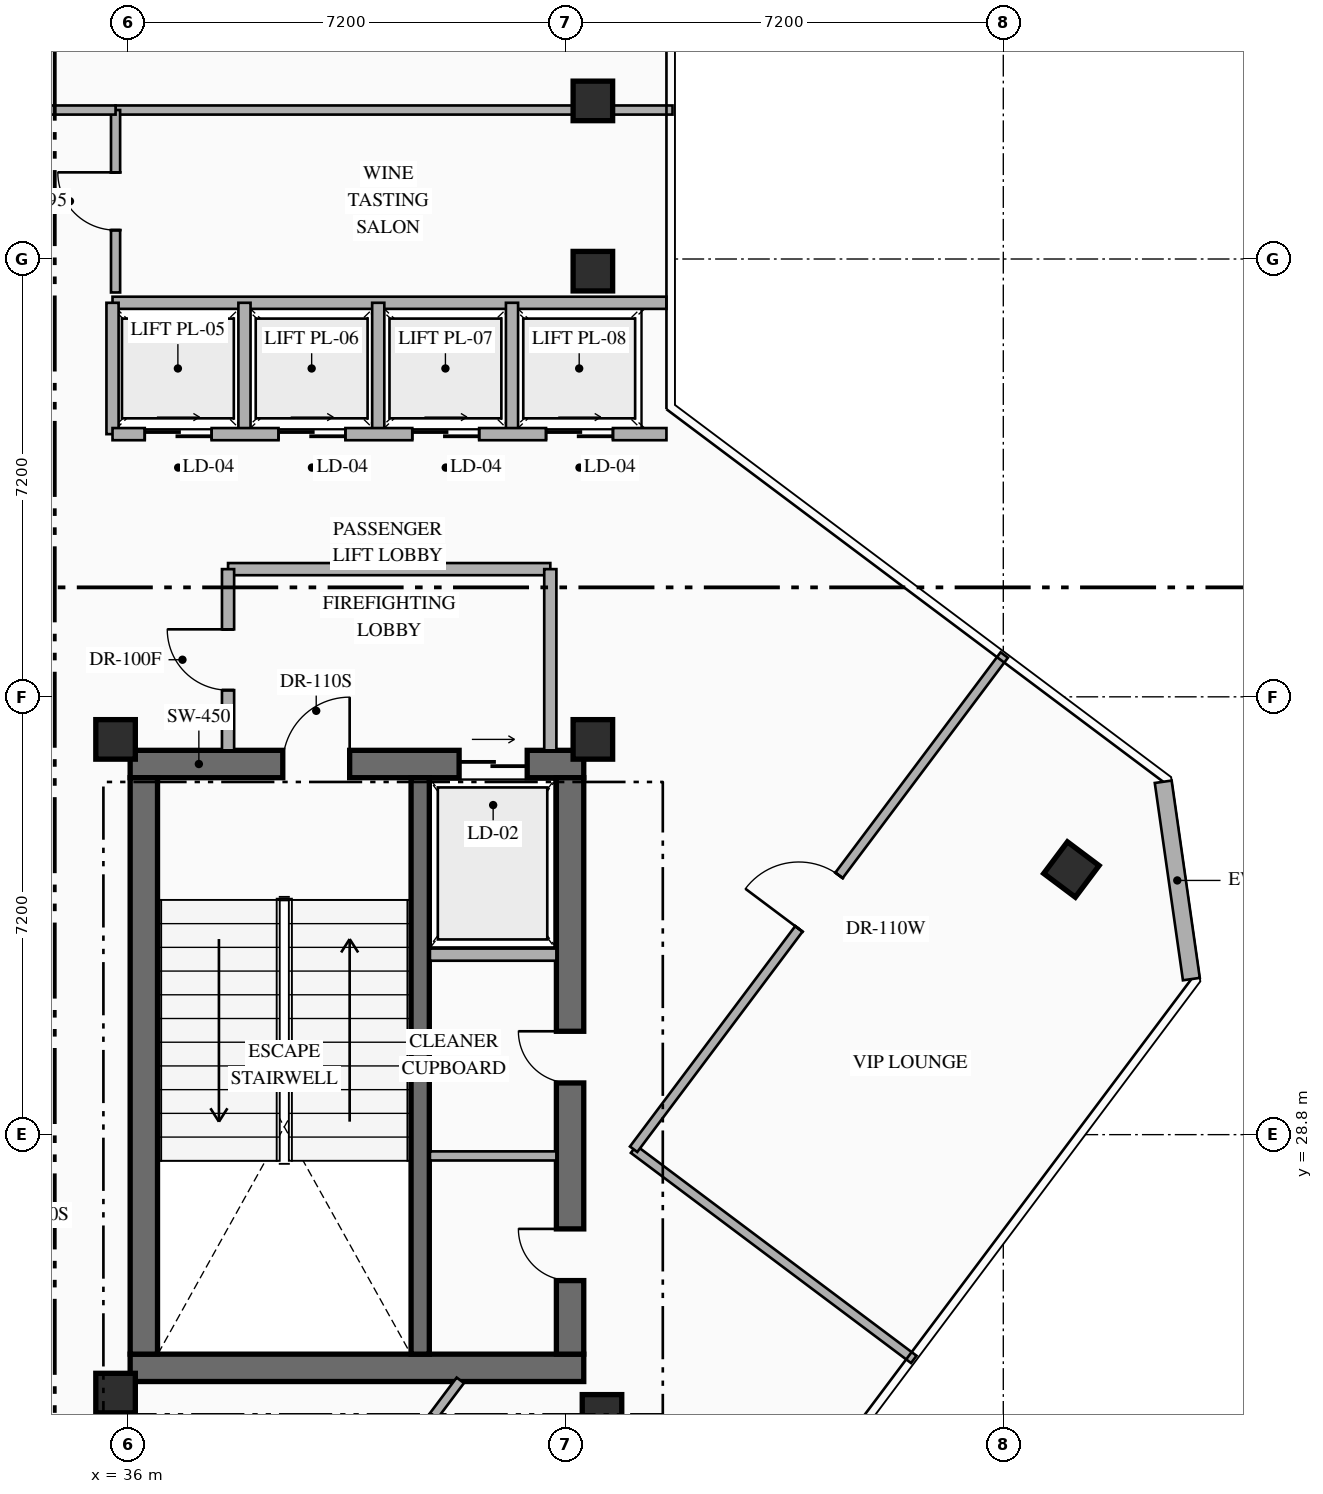
"""IFC4 building model, lengths in metres.
Left out: names, types, materials, properties, quantities, classifications, styles, units other than length and angle.
Written with IfcOpenShell. Run it as: python <this file> out.ifc"""

import sys

from ifc_helpers import new_model, si_unit, direction, frame, frame_2d, origin, origin_2d, place, context, subcontext, project, spatial, rectangle, hollow_rectangle, extrude, element, fill, save


model = new_model("IFC4")
c1 = context("Model", 3, precision=1e-05, world=origin(), true_north=direction((0.0, 1.0)))
c2 = subcontext(c1, "Body", "Model", "MODEL_VIEW")
j1 = project(units=[si_unit("LENGTHUNIT", "METRE"), si_unit("PLANEANGLEUNIT", "RADIAN")], contexts=[c1])
p1 = place(None, origin())
s1 = spatial("IfcSite", under=j1, at=p1, CompositionType="ELEMENT")
p2 = place(p1, origin())
s2 = spatial("IfcBuilding", under=s1, at=p2, CompositionType="ELEMENT")
p3 = place(p2, frame((0.0, 0.0, 257.55)))
s3 = spatial("IfcBuildingStorey", under=s2, at=p3, CompositionType="ELEMENT", Elevation=257.55)
p4 = place(p3, frame((36.04, 24.965, 0.0), z_axis=(0.0, 0.0, 1.0), x_axis=(1.0, 0.0, 0.0)))
e1 = element("IfcWall", 1, at=p4, inside=s3, PredefinedType="SHEAR", context=c2, shape_type="SweptSolid", body=[
    extrude(rectangle(XDim=7.46, YDim=0.45, at=frame_2d((3.73, 0.0))), origin(), (0.0, 0.0, 1.0), 4.2),
])
p5 = place(p3, frame((36.04, 34.895, 0.0), z_axis=(0.0, 0.0, 1.0), x_axis=(1.0, 0.0, 0.0)))
e2 = element("IfcWall", 2, at=p5, inside=s3, PredefinedType="SHEAR", context=c2, shape_type="SweptSolid", body=[
    extrude(rectangle(XDim=7.46, YDim=0.45, at=frame_2d((3.73, 0.0))), origin(), (0.0, 0.0, 1.0), 4.2),
])
p6 = place(p5, frame((2.51, 0.0, 0.0)))
e3 = element("IfcOpeningElement", 3, at=p6, cuts=e2, PredefinedType="OPENING", context=c2, shape_type="SweptSolid", body=[
    extrude(rectangle(XDim=1.1, YDim=2.2, at=frame_2d((0.55, 1.1))), frame((0.0, 0.235, 0.0), z_axis=(0.0, -1.0, 0.0), x_axis=(1.0, 0.0, 0.0)), (0.0, 0.0, 1.0), 0.47),
])
p7 = place(p5, frame((5.41, 0.0, 0.0)))
e4 = element("IfcOpeningElement", 4, at=p7, cuts=e2, PredefinedType="OPENING", context=c2, shape_type="SweptSolid", body=[
    extrude(rectangle(XDim=1.12, YDim=2.15, at=frame_2d((0.56, 1.075))), frame((0.0, 0.235, 0.0), z_axis=(0.0, -1.0, 0.0), x_axis=(1.0, 0.0, 0.0)), (0.0, 0.0, 1.0), 0.47),
])
p8 = place(p3, frame((36.265, 25.19, 0.0), z_axis=(0.0, 0.0, 1.0), x_axis=(0.0, 1.0, 0.0)))
e5 = element("IfcWall", 5, at=p8, inside=s3, PredefinedType="SHEAR", context=c2, shape_type="SweptSolid", body=[
    extrude(rectangle(XDim=9.48, YDim=0.45, at=frame_2d((4.74, 0.0))), origin(), (0.0, 0.0, 1.0), 4.2),
])
p9 = place(p3, frame((43.275, 25.19, 0.0), z_axis=(0.0, 0.0, 1.0), x_axis=(0.0, 1.0, 0.0)))
e6 = element("IfcWall", 6, at=p9, inside=s3, PredefinedType="SHEAR", context=c2, shape_type="SweptSolid", body=[
    extrude(rectangle(XDim=9.48, YDim=0.45, at=frame_2d((4.74, 0.0))), origin(), (0.0, 0.0, 1.0), 4.2),
])
p10 = place(p9, frame((1.21, 0.0, 0.0)))
e7 = element("IfcOpeningElement", 7, at=p10, cuts=e6, PredefinedType="OPENING", context=c2, shape_type="SweptSolid", body=[
    extrude(rectangle(XDim=0.85, YDim=2.08, at=frame_2d((0.425, 1.04))), frame((0.0, 0.235, 0.0), z_axis=(0.0, -1.0, 0.0), x_axis=(1.0, 0.0, 0.0)), (0.0, 0.0, 1.0), 0.47),
])
p11 = place(p9, frame((4.46, 0.0, 0.0)))
e8 = element("IfcOpeningElement", 8, at=p11, cuts=e6, PredefinedType="OPENING", context=c2, shape_type="SweptSolid", body=[
    extrude(rectangle(XDim=0.85, YDim=2.08, at=frame_2d((0.425, 1.04))), frame((0.0, 0.235, 0.0), z_axis=(0.0, -1.0, 0.0), x_axis=(1.0, 0.0, 0.0)), (0.0, 0.0, 1.0), 0.47),
])
p12 = place(p3, frame((40.81, 25.19, 0.0), z_axis=(0.0, 0.0, 1.0), x_axis=(0.0, 1.0, 0.0)))
e9 = element("IfcWall", 9, at=p12, inside=s3, PredefinedType="SHEAR", context=c2, shape_type="SweptSolid", body=[
    extrude(rectangle(XDim=9.48, YDim=0.3, at=frame_2d((4.74, 0.0))), origin(), (0.0, 0.0, 1.0), 4.2),
])
for number, where, z_axis, x_axis in (
    (10, (35.8, 24.55, 0.0), (0.0, 0.0, 1.0), (1.0, 0.0, 0.0)),
    (11, (43.8, 24.2, 0.0), (0.0, 0.0, 1.0), (1.0, 0.0, 0.0)),
    (12, (35.8, 35.3, 0.0), (0.0, 0.0, 1.0), (1.0, 0.0, 0.0)),
    (13, (43.65, 35.3, 0.0), (0.0, 0.0, 1.0), (1.0, 0.0, 0.0)),
    (14, (43.65, 43.0, 0.0), (0.0, 0.0, 1.0), (1.0, 0.0, 0.0)),
    (15, (43.65, 45.8, 0.0), (0.0, 0.0, 1.0), (1.0, 0.0, 0.0)),
    (16, (51.52, 33.16, 0.0), (0.0, 0.0, 1.0), (0.8, -0.6, 0.0)),
):
    element("IfcColumn", number, at=place(p3, frame(where, z_axis=z_axis, x_axis=x_axis)), inside=s3, PredefinedType="COLUMN", context=c2, shape_type="SweptSolid", body=[
        extrude(hollow_rectangle(XDim=0.65, YDim=0.65, WallThickness=0.025, at=origin_2d()), origin(), (0.0, 0.0, 1.0), 4.2),
    ])
p13 = place(p3, frame((53.03, 34.603, 0.0), z_axis=(0.0, 0.0, 1.0), x_axis=(0.141212810973, -0.989979263428, 0.0)))
e17 = element("IfcWall", 17, at=p13, inside=s3, PredefinedType="STANDARD", context=c2, shape_type="SweptSolid", body=[
    extrude(rectangle(XDim=3.278, YDim=0.28, at=frame_2d((1.639, 0.0))), origin(), (0.0, 0.0, 1.0), 3.95),
])
p14 = place(p3, frame((40.97, 31.76, 0.0), z_axis=(0.0, 0.0, 1.0), x_axis=(1.0, 0.0, 0.0)))
e18 = element("IfcWall", 18, at=p14, inside=s3, PredefinedType="STANDARD", context=c2, shape_type="SweptSolid", body=[
    extrude(rectangle(XDim=2.08, YDim=0.2, at=frame_2d((1.04, 0.0))), origin(), (0.0, 0.0, 1.0), 3.95),
])
p15 = place(p3, frame((40.97, 28.45, 0.0), z_axis=(0.0, 0.0, 1.0), x_axis=(1.0, 0.0, 0.0)))
e19 = element("IfcWall", 19, at=p15, inside=s3, PredefinedType="PARTITIONING", context=c2, shape_type="SweptSolid", body=[
    extrude(rectangle(XDim=2.08, YDim=0.15, at=frame_2d((1.04, 0.0))), origin(), (0.0, 0.0, 1.0), 3.95),
])
p16 = place(p3, frame((37.65, 38.1, 0.0), z_axis=(0.0, 0.0, 1.0), x_axis=(1.0, 0.0, 0.0)))
e20 = element("IfcWall", 20, at=p16, inside=s3, PredefinedType="STANDARD", context=c2, shape_type="SweptSolid", body=[
    extrude(rectangle(XDim=5.3, YDim=0.2, at=frame_2d((2.65, 0.0))), origin(), (0.0, 0.0, 1.0), 3.95),
])
p17 = place(p3, frame((42.95, 35.12, 0.0), z_axis=(0.0, 0.0, 1.0), x_axis=(0.0, 1.0, 0.0)))
e21 = element("IfcWall", 21, at=p17, inside=s3, PredefinedType="STANDARD", context=c2, shape_type="SweptSolid", body=[
    extrude(rectangle(XDim=2.98, YDim=0.2, at=frame_2d((1.49, 0.0))), origin(), (0.0, 0.0, 1.0), 3.95),
])
p18 = place(p3, frame((37.65, 35.12, 0.0), z_axis=(0.0, 0.0, 1.0), x_axis=(0.0, 1.0, 0.0)))
e22 = element("IfcWall", 22, at=p18, inside=s3, PredefinedType="STANDARD", context=c2, shape_type="SweptSolid", body=[
    extrude(rectangle(XDim=2.98, YDim=0.2, at=frame_2d((1.49, 0.0))), origin(), (0.0, 0.0, 1.0), 3.95),
])
p19 = place(p18, frame((0.99, 0.0, 0.0)))
e23 = element("IfcOpeningElement", 23, at=p19, cuts=e22, PredefinedType="OPENING", context=c2, shape_type="SweptSolid", body=[
    extrude(rectangle(XDim=1.0, YDim=2.2, at=frame_2d((0.5, 1.1))), frame((0.0, 0.11, 0.0), z_axis=(0.0, -1.0, 0.0), x_axis=(1.0, 0.0, 0.0)), (0.0, 0.0, 1.0), 0.22),
])
p20 = place(p3, frame((35.75, 42.48, 0.0), z_axis=(0.0, 0.0, 1.0), x_axis=(1.0, 0.0, 0.0)))
e24 = element("IfcWall", 24, at=p20, inside=s3, PredefinedType="STANDARD", context=c2, shape_type="SweptSolid", body=[
    extrude(rectangle(XDim=9.11, YDim=0.2, at=frame_2d((4.555, 0.0))), origin(), (0.0, 0.0, 1.0), 3.95),
])
for number, where, z_axis, x_axis in (
    (25, (35.75, 40.32, 0.0), (0.0, 0.0, 1.0), (0.0, 1.0, 0.0)),
    (26, (37.92, 40.32, 0.0), (0.0, 0.0, 1.0), (0.0, 1.0, 0.0)),
    (27, (40.12, 40.32, 0.0), (0.0, 0.0, 1.0), (0.0, 1.0, 0.0)),
    (28, (42.32, 40.32, 0.0), (0.0, 0.0, 1.0), (0.0, 1.0, 0.0)),
):
    element("IfcWall", number, at=place(p3, frame(where, z_axis=z_axis, x_axis=x_axis)), inside=s3, PredefinedType="STANDARD", context=c2, shape_type="SweptSolid", body=[
        extrude(rectangle(XDim=2.16, YDim=0.2, at=frame_2d((1.08, 0.0))), origin(), (0.0, 0.0, 1.0), 3.95),
    ])
p21 = place(p3, frame((35.75, 40.32, 0.0), z_axis=(0.0, 0.0, 1.0), x_axis=(1.0, 0.0, 0.0)))
e29 = element("IfcWall", 29, at=p21, inside=s3, PredefinedType="STANDARD", context=c2, shape_type="SweptSolid", body=[
    extrude(rectangle(XDim=9.11, YDim=0.2, at=frame_2d((4.555, 0.0))), origin(), (0.0, 0.0, 1.0), 3.95),
])
p22 = place(p21, frame((0.53, 0.0, 0.0)))
e30 = element("IfcOpeningElement", 30, at=p22, cuts=e29, PredefinedType="OPENING", context=c2, shape_type="SweptSolid", body=[
    extrude(rectangle(XDim=1.1, YDim=2.18, at=frame_2d((0.55, 1.09))), frame((0.0, 0.11, 0.0), z_axis=(0.0, -1.0, 0.0), x_axis=(1.0, 0.0, 0.0)), (0.0, 0.0, 1.0), 0.22),
])
p23 = place(p21, frame((2.73, 0.0, 0.0)))
e31 = element("IfcOpeningElement", 31, at=p23, cuts=e29, PredefinedType="OPENING", context=c2, shape_type="SweptSolid", body=[
    extrude(rectangle(XDim=1.1, YDim=2.18, at=frame_2d((0.55, 1.09))), frame((0.0, 0.11, 0.0), z_axis=(0.0, -1.0, 0.0), x_axis=(1.0, 0.0, 0.0)), (0.0, 0.0, 1.0), 0.22),
])
p24 = place(p21, frame((4.93, 0.0, 0.0)))
e32 = element("IfcOpeningElement", 32, at=p24, cuts=e29, PredefinedType="OPENING", context=c2, shape_type="SweptSolid", body=[
    extrude(rectangle(XDim=1.1, YDim=2.18, at=frame_2d((0.55, 1.09))), frame((0.0, 0.11, 0.0), z_axis=(0.0, -1.0, 0.0), x_axis=(1.0, 0.0, 0.0)), (0.0, 0.0, 1.0), 0.22),
])
p25 = place(p21, frame((7.13, 0.0, 0.0)))
e33 = element("IfcOpeningElement", 33, at=p25, cuts=e29, PredefinedType="OPENING", context=c2, shape_type="SweptSolid", body=[
    extrude(rectangle(XDim=1.1, YDim=2.18, at=frame_2d((0.55, 1.09))), frame((0.0, 0.11, 0.0), z_axis=(0.0, -1.0, 0.0), x_axis=(1.0, 0.0, 0.0)), (0.0, 0.0, 1.0), 0.22),
])
p26 = place(p3, frame((35.8, 45.65, 0.0), z_axis=(0.0, 0.0, 1.0), x_axis=(1.0, 0.0, 0.0)))
e34 = element("IfcWall", 34, at=p26, inside=s3, PredefinedType="PARTITIONING", context=c2, shape_type="SweptSolid", body=[
    extrude(rectangle(XDim=9.16, YDim=0.15, at=frame_2d((4.58, 0.0))), origin(), (0.0, 0.0, 1.0), 3.357),
])
p27 = place(p3, frame((35.8, 42.65, 0.0), z_axis=(0.0, 0.0, 1.0), x_axis=(0.0, 1.0, 0.0)))
e35 = element("IfcWall", 35, at=p27, inside=s3, PredefinedType="PARTITIONING", context=c2, shape_type="SweptSolid", body=[
    extrude(rectangle(XDim=3.0, YDim=0.15, at=frame_2d((1.5, 0.0))), origin(), (0.0, 0.0, 1.0), 3.95),
])
p28 = place(p27, frame((1.025, 0.0, 0.0)))
e36 = element("IfcOpeningElement", 36, at=p28, cuts=e35, PredefinedType="OPENING", context=c2, shape_type="SweptSolid", body=[
    extrude(rectangle(XDim=0.95, YDim=2.15, at=frame_2d((0.475, 1.075))), frame((0.0, 0.085, 0.0), z_axis=(0.0, -1.0, 0.0), x_axis=(1.0, 0.0, 0.0)), (0.0, 0.0, 1.0), 0.17),
])
p29 = place(p3, frame((18.04, 45.65, 0.0), z_axis=(0.0, 0.0, 1.0), x_axis=(1.0, 0.0, 0.0)))
e37 = element("IfcWall", 37, at=p29, inside=s3, PredefinedType="PARTITIONING", context=c2, shape_type="SweptSolid", body=[
    extrude(rectangle(XDim=17.76, YDim=0.15, at=frame_2d((8.88, 0.0))), origin(), (0.0, 0.0, 1.0), 3.357),
])
p30 = place(p29, frame((9.98, 0.0, 0.0)))
e38 = element("IfcOpeningElement", 38, at=p30, cuts=e37, PredefinedType="OPENING", context=c2, shape_type="SweptSolid", body=[
    extrude(rectangle(XDim=1.0, YDim=2.15, at=frame_2d((0.5, 1.075))), frame((0.0, 0.085, 0.0), z_axis=(0.0, -1.0, 0.0), x_axis=(1.0, 0.0, 0.0)), (0.0, 0.0, 1.0), 0.17),
])
p31 = place(p3, frame((28.47, 25.76, 0.0), z_axis=(0.0, 0.0, 1.0), x_axis=(0.800001748029, -0.599997669287, 0.0)))
e39 = element("IfcWall", 39, at=p31, inside=s3, PredefinedType="PARTITIONING", context=c2, shape_type="SweptSolid", body=[
    extrude(rectangle(XDim=16.76, YDim=0.15, at=frame_2d((8.38, 0.0))), origin(), (0.0, 0.0, 1.0), 3.95),
])
p32 = place(p31, frame((7.905, 0.0, 0.0)))
e40 = element("IfcOpeningElement", 40, at=p32, cuts=e39, PredefinedType="OPENING", context=c2, shape_type="SweptSolid", body=[
    extrude(rectangle(XDim=0.95, YDim=2.15, at=frame_2d((0.475, 1.075))), frame((0.0, 0.085, 0.0), z_axis=(0.0, -1.0, 0.0), x_axis=(1.0, 0.0, 0.0)), (0.0, 0.0, 1.0), 0.17),
])
p33 = place(p3, frame((44.32, 28.56, 0.0), z_axis=(0.0, 0.0, 1.0), x_axis=(0.79998982729, -0.600013563374, 0.0)))
e41 = element("IfcWall", 41, at=p33, inside=s3, PredefinedType="PARTITIONING", context=c2, shape_type="SweptSolid", body=[
    extrude(rectangle(XDim=5.76, YDim=0.15, at=frame_2d((2.88, 0.0))), origin(), (0.0, 0.0, 1.0), 3.95),
])
p34 = place(p3, frame((38.35, 20.6, 0.0), z_axis=(0.0, 0.0, 1.0), x_axis=(0.599992487743, 0.800005634138, 0.0)))
e42 = element("IfcWall", 42, at=p34, inside=s3, PredefinedType="PARTITIONING", context=c2, shape_type="SweptSolid", body=[
    extrude(rectangle(XDim=5.2, YDim=0.15, at=frame_2d((2.6, 0.0))), origin(), (0.0, 0.0, 1.0), 3.95),
])
p35 = place(p34, frame((2.05, 0.0, 0.0)))
e43 = element("IfcOpeningElement", 43, at=p35, cuts=e42, PredefinedType="OPENING", context=c2, shape_type="SweptSolid", body=[
    extrude(rectangle(XDim=1.1, YDim=2.16, at=frame_2d((0.55, 1.08))), frame((0.0, 0.085, 0.0), z_axis=(0.0, -1.0, 0.0), x_axis=(1.0, 0.0, 0.0)), (0.0, 0.0, 1.0), 0.17),
])
p36 = place(p3, frame((44.32, 28.56, 0.0), z_axis=(0.0, 0.0, 1.0), x_axis=(0.6, 0.8, 0.0)))
e44 = element("IfcWall", 44, at=p36, inside=s3, PredefinedType="PARTITIONING", context=c2, shape_type="SweptSolid", body=[
    extrude(rectangle(XDim=10.16, YDim=0.15, at=frame_2d((5.08, 0.0))), origin(), (0.0, 0.0, 1.0), 3.95),
])
p37 = place(p36, frame((4.53, 0.0, 0.0)))
e45 = element("IfcOpeningElement", 45, at=p37, cuts=e44, PredefinedType="OPENING", context=c2, shape_type="SweptSolid", body=[
    extrude(rectangle(XDim=1.1, YDim=2.16, at=frame_2d((0.55, 1.08))), frame((0.0, 0.085, 0.0), z_axis=(0.0, -1.0, 0.0), x_axis=(1.0, 0.0, 0.0)), (0.0, 0.0, 1.0), 0.17),
])
p38 = place(p6, origin())
e46 = element("IfcDoor", 46, at=p38, inside=s3, OperationType="SINGLE_SWING_RIGHT", PredefinedType="DOOR", context=c2, shape_type="SweptSolid", body=[
    extrude(rectangle(XDim=1.1, YDim=2.2, at=frame_2d((0.55, 1.1))), frame((0.0, 0.025, 0.0), z_axis=(0.0, -1.0, 0.0), x_axis=(1.0, 0.0, 0.0)), (0.0, 0.0, 1.0), 0.05),
])
fill(e3, e46)
p39 = place(p7, origin())
e47 = element("IfcDoor", 47, at=p39, inside=s3, OperationType="SLIDING_TO_RIGHT", PredefinedType="USERDEFINED", context=c2, shape_type="SweptSolid", body=[
    extrude(rectangle(XDim=1.12, YDim=2.15, at=frame_2d((0.56, 1.075))), frame((0.0, 0.025, 0.0), z_axis=(0.0, -1.0, 0.0), x_axis=(1.0, 0.0, 0.0)), (0.0, 0.0, 1.0), 0.05),
])
fill(e4, e47)
p40 = place(p10, origin())
e48 = element("IfcDoor", 48, at=p40, inside=s3, OperationType="SINGLE_SWING_RIGHT", PredefinedType="DOOR", context=c2, shape_type="SweptSolid", body=[
    extrude(rectangle(XDim=0.85, YDim=2.08, at=frame_2d((0.425, 1.04))), frame((0.0, 0.025, 0.0), z_axis=(0.0, -1.0, 0.0), x_axis=(1.0, 0.0, 0.0)), (0.0, 0.0, 1.0), 0.05),
])
fill(e7, e48)
p41 = place(p11, origin())
e49 = element("IfcDoor", 49, at=p41, inside=s3, OperationType="SINGLE_SWING_RIGHT", PredefinedType="DOOR", context=c2, shape_type="SweptSolid", body=[
    extrude(rectangle(XDim=0.85, YDim=2.08, at=frame_2d((0.425, 1.04))), frame((0.0, 0.025, 0.0), z_axis=(0.0, -1.0, 0.0), x_axis=(1.0, 0.0, 0.0)), (0.0, 0.0, 1.0), 0.05),
])
fill(e8, e49)
p42 = place(p19, origin())
e50 = element("IfcDoor", 50, at=p42, inside=s3, OperationType="SINGLE_SWING_RIGHT", PredefinedType="DOOR", context=c2, shape_type="SweptSolid", body=[
    extrude(rectangle(XDim=1.0, YDim=2.2, at=frame_2d((0.5, 1.1))), frame((0.0, 0.025, 0.0), z_axis=(0.0, -1.0, 0.0), x_axis=(1.0, 0.0, 0.0)), (0.0, 0.0, 1.0), 0.05),
])
fill(e23, e50)
p43 = place(p22, origin())
e51 = element("IfcDoor", 51, at=p43, inside=s3, OperationType="SLIDING_TO_RIGHT", PredefinedType="USERDEFINED", context=c2, shape_type="SweptSolid", body=[
    extrude(rectangle(XDim=1.1, YDim=2.18, at=frame_2d((0.55, 1.09))), frame((0.0, 0.025, 0.0), z_axis=(0.0, -1.0, 0.0), x_axis=(1.0, 0.0, 0.0)), (0.0, 0.0, 1.0), 0.05),
])
fill(e30, e51)
p44 = place(p23, origin())
e52 = element("IfcDoor", 52, at=p44, inside=s3, OperationType="SLIDING_TO_RIGHT", PredefinedType="USERDEFINED", context=c2, shape_type="SweptSolid", body=[
    extrude(rectangle(XDim=1.1, YDim=2.18, at=frame_2d((0.55, 1.09))), frame((0.0, 0.025, 0.0), z_axis=(0.0, -1.0, 0.0), x_axis=(1.0, 0.0, 0.0)), (0.0, 0.0, 1.0), 0.05),
])
fill(e31, e52)
p45 = place(p24, origin())
e53 = element("IfcDoor", 53, at=p45, inside=s3, OperationType="SLIDING_TO_RIGHT", PredefinedType="USERDEFINED", context=c2, shape_type="SweptSolid", body=[
    extrude(rectangle(XDim=1.1, YDim=2.18, at=frame_2d((0.55, 1.09))), frame((0.0, 0.025, 0.0), z_axis=(0.0, -1.0, 0.0), x_axis=(1.0, 0.0, 0.0)), (0.0, 0.0, 1.0), 0.05),
])
fill(e32, e53)
p46 = place(p25, origin())
e54 = element("IfcDoor", 54, at=p46, inside=s3, OperationType="SLIDING_TO_RIGHT", PredefinedType="USERDEFINED", context=c2, shape_type="SweptSolid", body=[
    extrude(rectangle(XDim=1.1, YDim=2.18, at=frame_2d((0.55, 1.09))), frame((0.0, 0.025, 0.0), z_axis=(0.0, -1.0, 0.0), x_axis=(1.0, 0.0, 0.0)), (0.0, 0.0, 1.0), 0.05),
])
fill(e33, e54)
p47 = place(p28, origin())
e55 = element("IfcDoor", 55, at=p47, inside=s3, OperationType="SINGLE_SWING_RIGHT", PredefinedType="DOOR", context=c2, shape_type="SweptSolid", body=[
    extrude(rectangle(XDim=0.95, YDim=2.15, at=frame_2d((0.475, 1.075))), frame((0.0, 0.025, 0.0), z_axis=(0.0, -1.0, 0.0), x_axis=(1.0, 0.0, 0.0)), (0.0, 0.0, 1.0), 0.05),
])
fill(e36, e55)
p48 = place(p37, origin())
e56 = element("IfcDoor", 56, at=p48, inside=s3, OperationType="SINGLE_SWING_LEFT", PredefinedType="DOOR", context=c2, shape_type="SweptSolid", body=[
    extrude(rectangle(XDim=1.1, YDim=2.16, at=frame_2d((0.55, 1.08))), frame((0.0, 0.025, 0.0), z_axis=(0.0, -1.0, 0.0), x_axis=(1.0, 0.0, 0.0)), (0.0, 0.0, 1.0), 0.05),
])
fill(e45, e56)
save(model, sys.argv[1])
